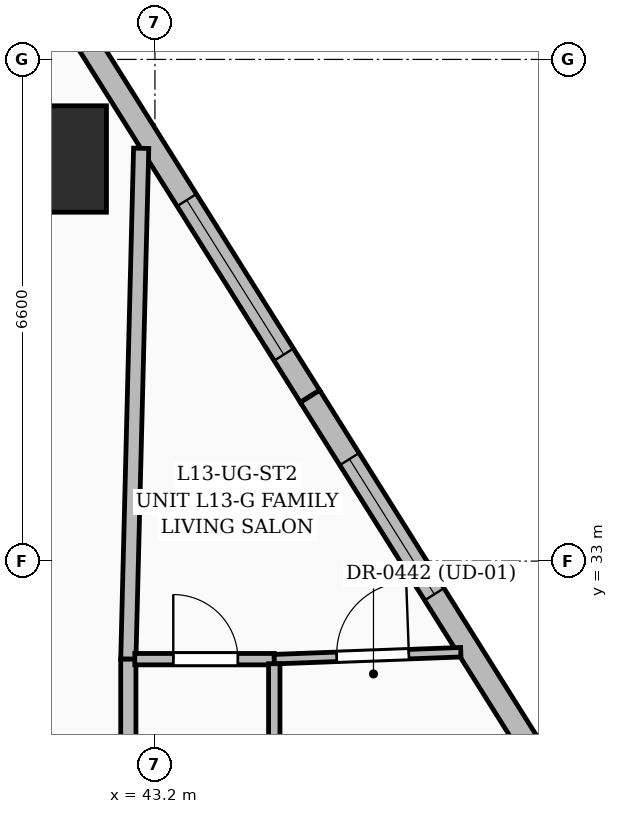
"""IFC4 building model, lengths in metres.
Left out: names, types, materials, properties, quantities, classifications, styles, units other than length and angle.
Written with IfcOpenShell. Run it as: python <this file> out.ifc"""

import sys

from ifc_helpers import new_model, si_unit, direction, frame, frame_2d, origin, origin_2d, place, context, subcontext, project, spatial, rectangle, extrude, element, fill, save


model = new_model("IFC4")
c1 = context("Model", 3, precision=1e-05, world=origin(), true_north=direction((0.0, 1.0)))
c2 = subcontext(c1, "Body", "Model", "MODEL_VIEW")
j1 = project(units=[si_unit("LENGTHUNIT", "METRE"), si_unit("PLANEANGLEUNIT", "RADIAN")], contexts=[c1])
p1 = place(None, origin())
s1 = spatial("IfcSite", under=j1, at=p1, CompositionType="ELEMENT")
p2 = place(p1, origin())
s2 = spatial("IfcBuilding", under=s1, at=p2, CompositionType="ELEMENT")
p3 = place(p2, frame((0.0, 0.0, 57.0)))
s3 = spatial("IfcBuildingStorey", under=s2, at=p3, CompositionType="ELEMENT", Elevation=57.0)
p4 = place(p3, frame((41.862, 38.29, 0.0), z_axis=(0.0, 0.0, 1.0), x_axis=(1.0, 0.0, 0.0)))
e1 = element("IfcColumn", 1, at=p4, inside=s3, PredefinedType="COLUMN", context=c2, shape_type="SweptSolid", body=[
    extrude(rectangle(XDim=1.4, YDim=1.4, at=origin_2d()), origin(), (0.0, 0.0, 1.0), 3.6),
])
p5 = place(p3, frame((42.116, 40.142, 0.0), z_axis=(0.0, 0.0, 1.0), x_axis=(0.531917865581, -0.846795951972, 0.0)))
e2 = element("IfcWall", 2, at=p5, inside=s3, PredefinedType="SOLIDWALL", context=c2, shape_type="SweptSolid", body=[
    extrude(rectangle(XDim=5.874, YDim=0.3, at=frame_2d((2.937, 0.0))), origin(), (0.0, 0.0, 1.0), 3.35),
])
p6 = place(p5, frame((2.825, 0.0, 0.6)))
e3 = element("IfcOpeningElement", 3, at=p6, cuts=e2, PredefinedType="OPENING", context=c2, shape_type="SweptSolid", body=[
    extrude(rectangle(XDim=2.4, YDim=2.1, at=frame_2d((1.2, 1.05))), frame((0.0, 0.16, 0.0), z_axis=(0.0, -1.0, 0.0), x_axis=(1.0, 0.0, 0.0)), (0.0, 0.0, 1.0), 0.32),
])
p7 = place(p3, frame((45.24, 35.167, 0.0), z_axis=(0.0, 0.0, 1.0), x_axis=(0.53188806159, -0.846814672723, 0.0)))
e4 = element("IfcWall", 4, at=p7, inside=s3, PredefinedType="SOLIDWALL", context=c2, shape_type="SweptSolid", body=[
    extrude(rectangle(XDim=5.874, YDim=0.3, at=frame_2d((2.937, 0.0))), origin(), (0.0, 0.0, 1.0), 3.35),
])
p8 = place(p7, frame((0.975, 0.0, 0.55)))
e5 = element("IfcOpeningElement", 5, at=p8, cuts=e4, PredefinedType="OPENING", context=c2, shape_type="SweptSolid", body=[
    extrude(rectangle(XDim=2.1, YDim=2.4, at=frame_2d((1.05, 1.2))), frame((0.0, 0.16, 0.0), z_axis=(0.0, -1.0, 0.0), x_axis=(1.0, 0.0, 0.0)), (0.0, 0.0, 1.0), 0.32),
])
p9 = place(p3, frame((42.85, 31.71, 0.0), z_axis=(0.0, 0.0, 1.0), x_axis=(0.025129190117, 0.999684212041, 0.0)))
e6 = element("IfcWall", 6, at=p9, inside=s3, PredefinedType="PARTITIONING", context=c2, shape_type="SweptSolid", body=[
    extrude(rectangle(XDim=6.723, YDim=0.2, at=frame_2d((3.362, 0.0))), origin(), (0.0, 0.0, 1.0), 2.37),
])
p10 = place(p3, frame((42.85, 27.69, 0.0), z_axis=(0.0, 0.0, 1.0), x_axis=(0.0, 1.0, 0.0)))
e7 = element("IfcWall", 7, at=p10, inside=s3, PredefinedType="PARTITIONING", context=c2, shape_type="SweptSolid", body=[
    extrude(rectangle(XDim=4.02, YDim=0.2, at=frame_2d((2.01, 0.0))), origin(), (0.0, 0.0, 1.0), 2.279),
])
p11 = place(p3, frame((42.935, 31.71, 0.0), z_axis=(0.0, 0.0, 1.0), x_axis=(1.0, 0.0, 0.0)))
e8 = element("IfcWall", 8, at=p11, inside=s3, PredefinedType="PARTITIONING", context=c2, shape_type="SweptSolid", body=[
    extrude(rectangle(XDim=1.835, YDim=0.15, at=frame_2d((0.917, 0.0))), origin(), (0.0, 0.0, 1.0), 3.35),
])
p12 = place(p11, frame((0.506, 0.0, 0.0)))
e9 = element("IfcOpeningElement", 9, at=p12, cuts=e8, PredefinedType="OPENING", context=c2, shape_type="SweptSolid", body=[
    extrude(rectangle(XDim=0.85, YDim=2.1, at=frame_2d((0.425, 1.05))), frame((0.0, 0.085, 0.0), z_axis=(0.0, -1.0, 0.0), x_axis=(1.0, 0.0, 0.0)), (0.0, 0.0, 1.0), 0.17),
])
p13 = place(p3, frame((44.77, 31.71, 0.0), z_axis=(0.0, 0.0, 1.0), x_axis=(0.99931224383, 0.037081522776, 0.0)))
e10 = element("IfcWall", 10, at=p13, inside=s3, PredefinedType="PARTITIONING", context=c2, shape_type="SweptSolid", body=[
    extrude(rectangle(XDim=2.456, YDim=0.125, at=frame_2d((1.228, 0.0))), origin(), (0.0, 0.0, 1.0), 2.37),
])
p14 = place(p13, frame((0.822, 0.0, 0.0)))
e11 = element("IfcOpeningElement", 11, at=p14, cuts=e10, PredefinedType="OPENING", context=c2, shape_type="SweptSolid", body=[
    extrude(rectangle(XDim=0.95, YDim=2.2, at=frame_2d((0.475, 1.1))), frame((0.0, 0.072, 0.0), z_axis=(0.0, -1.0, 0.0), x_axis=(1.0, 0.0, 0.0)), (0.0, 0.0, 1.0), 0.145),
])
p15 = place(p3, frame((44.77, 27.775, 0.0), z_axis=(0.0, 0.0, 1.0), x_axis=(0.0, 1.0, 0.0)))
e12 = element("IfcWall", 12, at=p15, inside=s3, PredefinedType="PARTITIONING", context=c2, shape_type="SweptSolid", body=[
    extrude(rectangle(XDim=3.875, YDim=0.15, at=frame_2d((1.938, 0.0))), origin(), (0.0, 0.0, 1.0), 3.35),
])
p16 = place(p6, origin())
e13 = element("IfcWindow", 13, at=p16, inside=s3, PartitioningType="SINGLE_PANEL", PredefinedType="WINDOW", context=c2, shape_type="SweptSolid", body=[
    extrude(rectangle(XDim=2.4, YDim=2.1, at=frame_2d((1.2, 1.05))), frame((0.0, 0.03, 0.0), z_axis=(0.0, -1.0, 0.0), x_axis=(1.0, 0.0, 0.0)), (0.0, 0.0, 1.0), 0.06),
])
fill(e3, e13)
p17 = place(p8, origin())
e14 = element("IfcWindow", 14, at=p17, inside=s3, PartitioningType="SINGLE_PANEL", PredefinedType="WINDOW", context=c2, shape_type="SweptSolid", body=[
    extrude(rectangle(XDim=2.1, YDim=2.4, at=frame_2d((1.05, 1.2))), frame((0.0, 0.03, 0.0), z_axis=(0.0, -1.0, 0.0), x_axis=(1.0, 0.0, 0.0)), (0.0, 0.0, 1.0), 0.06),
])
fill(e5, e14)
p18 = place(p14, origin())
e15 = element("IfcDoor", 15, at=p18, inside=s3, OperationType="SINGLE_SWING_RIGHT", PredefinedType="DOOR", context=c2, shape_type="SweptSolid", body=[
    extrude(rectangle(XDim=0.95, YDim=2.2, at=frame_2d((0.475, 1.1))), frame((0.0, 0.025, 0.0), z_axis=(0.0, -1.0, 0.0), x_axis=(1.0, 0.0, 0.0)), (0.0, 0.0, 1.0), 0.05),
])
fill(e11, e15)
p19 = place(p12, origin())
e16 = element("IfcDoor", 16, at=p19, inside=s3, OperationType="SINGLE_SWING_LEFT", PredefinedType="DOOR", context=c2, shape_type="SweptSolid", body=[
    extrude(rectangle(XDim=0.85, YDim=2.1, at=frame_2d((0.425, 1.05))), frame((0.0, 0.025, 0.0), z_axis=(0.0, -1.0, 0.0), x_axis=(1.0, 0.0, 0.0)), (0.0, 0.0, 1.0), 0.05),
])
fill(e9, e16)
save(model, sys.argv[1])
